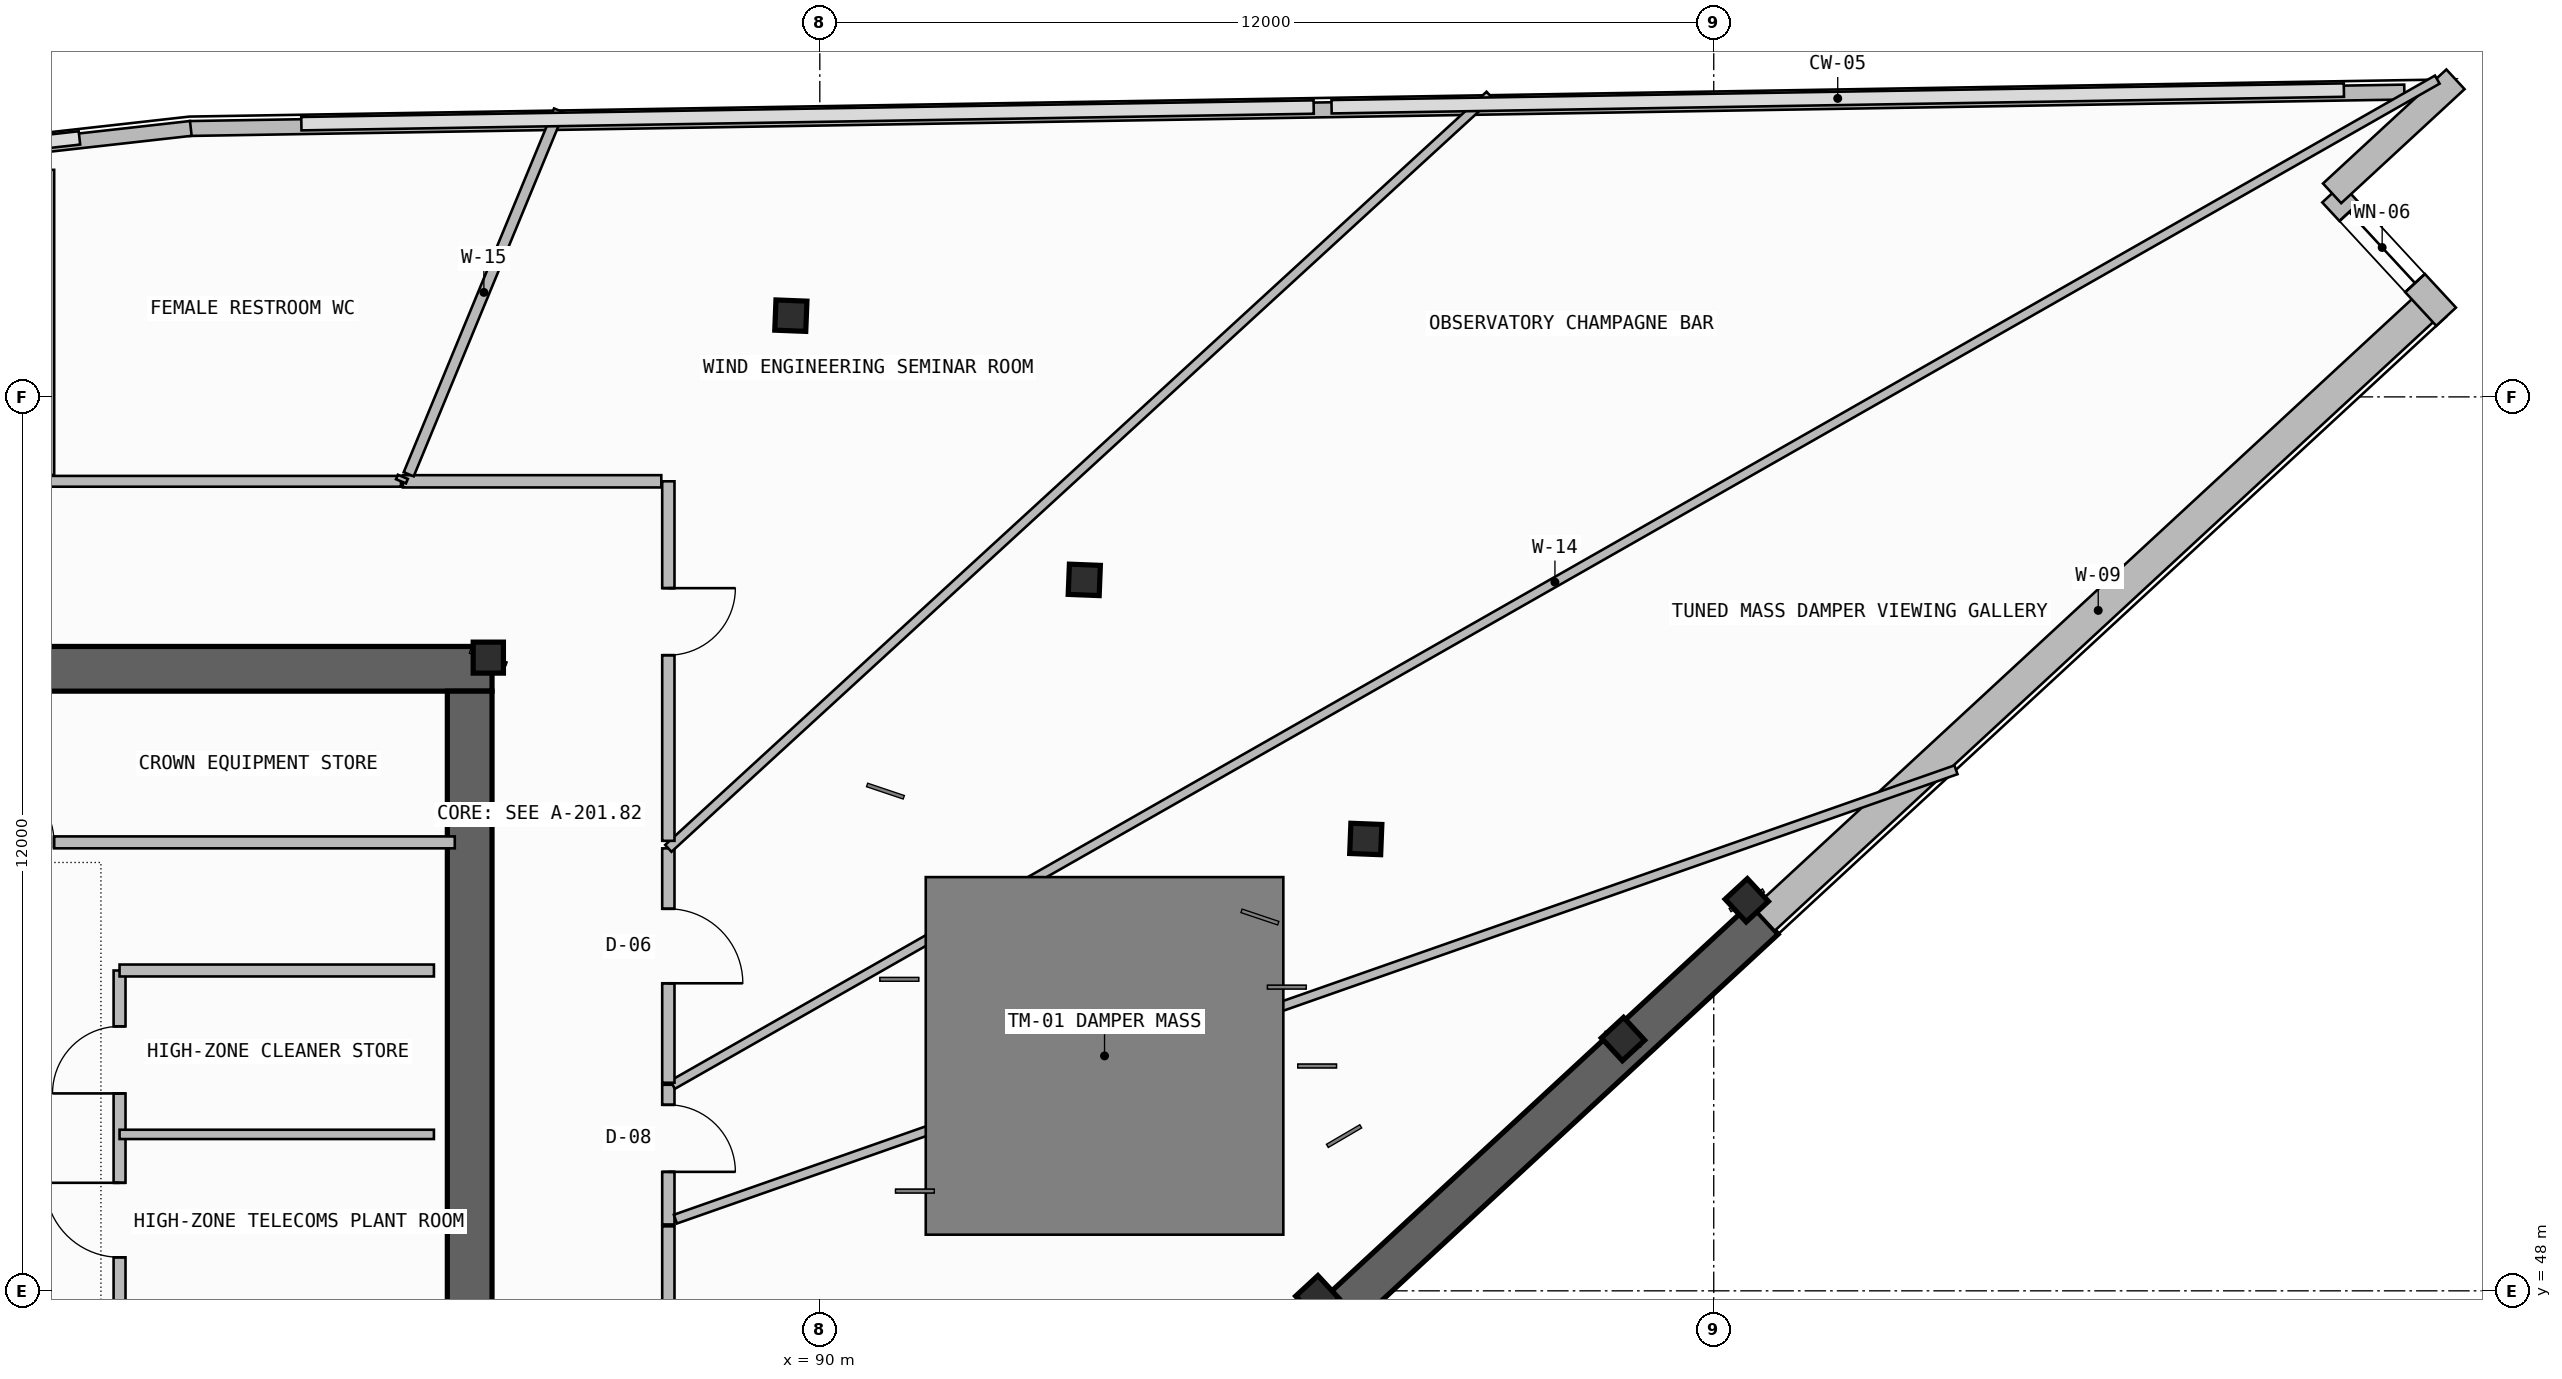
"""IFC4 building model, lengths in metres.
Left out: names, types, materials, properties, quantities, classifications, styles, units other than length and angle.
Written with IfcOpenShell. Run it as: python <this file> out.ifc"""

import sys

from ifc_helpers import new_model, si_unit, direction, frame, frame_2d, origin, origin_2d, place, context, subcontext, project, spatial, rectangle, i_section, extrude, element, fill, save


model = new_model("IFC4")
c1 = context("Model", 3, precision=1e-05, world=origin(), true_north=direction((0.0, 1.0)))
c2 = subcontext(c1, "Body", "Model", "MODEL_VIEW")
j1 = project(units=[si_unit("LENGTHUNIT", "METRE"), si_unit("PLANEANGLEUNIT", "RADIAN")], contexts=[c1])
p1 = place(None, origin())
s1 = spatial("IfcSite", under=j1, at=p1, CompositionType="ELEMENT")
p2 = place(p1, origin())
s2 = spatial("IfcBuilding", under=s1, at=p2, CompositionType="ELEMENT")
p3 = place(p2, frame((0.0, 0.0, 292.42)))
s3 = spatial("IfcBuildingStorey", under=s2, at=p3, CompositionType="ELEMENT", Elevation=292.42)
p4 = place(p3, frame((72.0, 56.35, -0.26), z_axis=(0.0, 0.0, 1.0), x_axis=(1.0, 0.0, 0.0)))
e1 = element("IfcWall", 1, at=p4, inside=s3, PredefinedType="SHEAR", context=c2, shape_type="SweptSolid", body=[
    extrude(rectangle(XDim=13.6, YDim=0.6, at=frame_2d((6.8, 0.0))), origin(), (0.0, 0.0, 1.0), 5.82),
])
p5 = place(p3, frame((85.3, 47.6, -0.26), z_axis=(0.0, 0.0, 1.0), x_axis=(0.0, 1.0, 0.0)))
e2 = element("IfcWall", 2, at=p5, inside=s3, PredefinedType="SHEAR", context=c2, shape_type="SweptSolid", body=[
    extrude(rectangle(XDim=8.45, YDim=0.6, at=frame_2d((4.225, 0.0))), origin(), (0.0, 0.0, 1.0), 5.82),
])
for number, where, z_axis, x_axis in (
    (3, (85.55, 56.5, 0.0), (0.0, 0.0, 1.0), (1.0, 0.0, 0.0)),
    (4, (96.679, 47.914, 0.0), (0.0, 0.0, 1.0), (0.734, 0.679, 0.0)),
    (5, (102.443, 53.242, 0.0), (0.0, 0.0, 1.0), (0.734, 0.679, 0.0)),
    (6, (100.782, 51.38, 0.0), (0.0, 0.0, 1.0), (0.734, 0.679, 0.0)),
    (7, (97.329, 54.065, 0.0), (0.0, 0.0, 1.0), (0.039, 0.999, 0.0)),
    (8, (93.55, 57.544, 0.0), (0.0, 0.0, 1.0), (0.039, 0.999, 0.0)),
    (9, (89.611, 61.09, 0.0), (0.0, 0.0, 1.0), (0.039, 0.999, 0.0)),
):
    element("IfcColumn", number, at=place(p3, frame(where, z_axis=z_axis, x_axis=x_axis)), inside=s3, PredefinedType="COLUMN", context=c2, shape_type="SweptSolid", body=[
        extrude(i_section(OverallWidth=0.406, OverallDepth=0.416, WebThickness=0.03, FlangeThickness=0.048, FilletRadius=0.015, at=origin_2d()), origin(), (0.0, 0.0, 1.0), 5.76),
    ])
p6 = place(p3, frame((90.508, 41.74, -0.26), z_axis=(0.0, 0.0, 1.0), x_axis=(0.734315848115, 0.678807951638, 0.0)))
e10 = element("IfcWall", 10, at=p6, inside=s3, PredefinedType="SHEAR", context=c2, shape_type="SweptSolid", body=[
    extrude(rectangle(XDim=16.573, YDim=0.55, at=frame_2d((8.286, 0.0))), origin(), (0.0, 0.0, 1.0), 5.82),
])
p7 = place(p3, frame((102.677, 52.989, 0.0), z_axis=(0.0, 0.0, 1.0), x_axis=(0.734331107219, 0.678791444386, 0.0)))
e11 = element("IfcWall", 11, at=p7, inside=s3, PredefinedType="SOLIDWALL", context=c2, shape_type="SweptSolid", body=[
    extrude(rectangle(XDim=12.211, YDim=0.42, at=frame_2d((6.106, 0.0))), origin(), (0.0, 0.0, 1.0), 2.195),
])
p8 = place(p3, frame((111.832, 61.076, 0.0), z_axis=(0.0, 0.0, 1.0), x_axis=(-0.678792531533, 0.734330102294, 0.0)))
e12 = element("IfcWall", 12, at=p8, inside=s3, PredefinedType="SOLIDWALL", context=c2, shape_type="SweptSolid", body=[
    extrude(rectangle(XDim=2.255, YDim=0.36, at=frame_2d((1.127, 0.0))), origin(), (0.0, 0.0, 1.0), 5.56),
])
p9 = place(p8, frame((0.615, 0.0, 0.45)))
e13 = element("IfcOpeningElement", 13, at=p9, cuts=e12, PredefinedType="OPENING", context=c2, shape_type="SweptSolid", body=[
    extrude(rectangle(XDim=1.3, YDim=2.4, at=frame_2d((0.65, 1.2))), frame((0.0, 0.19, 0.0), z_axis=(0.0, -1.0, 0.0), x_axis=(1.0, 0.0, 0.0)), (0.0, 0.0, 1.0), 0.38),
])
p10 = place(p3, frame((110.301, 62.732, 0.0), z_axis=(0.0, 0.0, 1.0), x_axis=(0.734330102294, 0.678792531533, 0.0)))
e14 = element("IfcWall", 14, at=p10, inside=s3, PredefinedType="SOLIDWALL", context=c2, shape_type="SweptSolid", body=[
    extrude(rectangle(XDim=2.255, YDim=0.36, at=frame_2d((1.127, 0.0))), origin(), (0.0, 0.0, 1.0), 5.56),
])
p11 = place(p3, frame((111.271, 64.092, 0.0), z_axis=(0.0, 0.0, 1.0), x_axis=(-0.999864741935, -0.016446818413, 0.0)))
e15 = element("IfcWall", 15, at=p11, inside=s3, PredefinedType="PARAPET", context=c2, shape_type="SweptSolid", body=[
    extrude(rectangle(XDim=29.733, YDim=0.2, at=frame_2d((14.866, 0.0))), origin(), (0.0, 0.0, 1.0), 1.15),
])
p12 = place(p3, frame((81.557, 63.604, 0.0), z_axis=(0.0, 0.0, 1.0), x_axis=(-0.993775831398, -0.111398370403, 0.0)))
e16 = element("IfcWall", 16, at=p12, inside=s3, PredefinedType="PARAPET", context=c2, shape_type="SweptSolid", body=[
    extrude(rectangle(XDim=29.764, YDim=0.2, at=frame_2d((14.882, 0.0))), origin(), (0.0, 0.0, 1.0), 1.15),
])
p13 = place(p3, frame((80.6, 47.7, 0.0), z_axis=(0.0, 0.0, 1.0), x_axis=(0.0, 1.0, 0.0)))
e17 = element("IfcWall", 17, at=p13, inside=s3, PredefinedType="SOLIDWALL", context=c2, shape_type="SweptSolid", body=[
    extrude(rectangle(XDim=4.6, YDim=0.16, at=frame_2d((2.3, 0.0))), origin(), (0.0, 0.0, 1.0), 5.56),
])
p14 = place(p13, frame((0.75, 0.0, 0.0)))
e18 = element("IfcOpeningElement", 18, at=p14, cuts=e17, PredefinedType="OPENING", context=c2, shape_type="SweptSolid", body=[
    extrude(rectangle(XDim=1.0, YDim=2.2, at=frame_2d((0.5, 1.1))), frame((0.0, 0.09, 0.0), z_axis=(0.0, -1.0, 0.0), x_axis=(1.0, 0.0, 0.0)), (0.0, 0.0, 1.0), 0.18),
])
p15 = place(p13, frame((2.95, 0.0, 0.0)))
e19 = element("IfcOpeningElement", 19, at=p15, cuts=e17, PredefinedType="OPENING", context=c2, shape_type="SweptSolid", body=[
    extrude(rectangle(XDim=0.9, YDim=2.1, at=frame_2d((0.45, 1.05))), frame((0.0, 0.09, 0.0), z_axis=(0.0, -1.0, 0.0), x_axis=(1.0, 0.0, 0.0)), (0.0, 0.0, 1.0), 0.18),
])
p16 = place(p3, frame((80.6, 52.3, 0.0), z_axis=(0.0, 0.0, 1.0), x_axis=(1.0, 0.0, 0.0)))
e20 = element("IfcWall", 20, at=p16, inside=s3, PredefinedType="SOLIDWALL", context=c2, shape_type="SweptSolid", body=[
    extrude(rectangle(XDim=4.22, YDim=0.16, at=frame_2d((2.11, 0.0))), origin(), (0.0, 0.0, 1.0), 5.56),
])
p17 = place(p3, frame((80.6, 50.1, 0.0), z_axis=(0.0, 0.0, 1.0), x_axis=(1.0, 0.0, 0.0)))
e21 = element("IfcWall", 21, at=p17, inside=s3, PredefinedType="PARTITIONING", context=c2, shape_type="SweptSolid", body=[
    extrude(rectangle(XDim=4.22, YDim=0.125, at=frame_2d((2.11, 0.0))), origin(), (0.0, 0.0, 1.0), 5.56),
])
p18 = place(p3, frame((73.02, 54.02, 0.0), z_axis=(0.0, 0.0, 1.0), x_axis=(1.0, 0.0, 0.0)))
e22 = element("IfcWall", 22, at=p18, inside=s3, PredefinedType="SOLIDWALL", context=c2, shape_type="SweptSolid", body=[
    extrude(rectangle(XDim=12.08, YDim=0.16, at=frame_2d((6.04, 0.0))), origin(), (0.0, 0.0, 1.0), 5.56),
])
p19 = place(p18, frame((0.5, 0.0, 0.0)))
e23 = element("IfcOpeningElement", 23, at=p19, cuts=e22, PredefinedType="OPENING", context=c2, shape_type="SweptSolid", body=[
    extrude(rectangle(XDim=1.1, YDim=2.25, at=frame_2d((0.55, 1.125))), frame((0.0, 0.09, 0.0), z_axis=(0.0, -1.0, 0.0), x_axis=(1.0, 0.0, 0.0)), (0.0, 0.0, 1.0), 0.18),
])
p20 = place(p18, frame((2.32, 0.0, 0.0)))
e24 = element("IfcOpeningElement", 24, at=p20, cuts=e22, PredefinedType="OPENING", context=c2, shape_type="SweptSolid", body=[
    extrude(rectangle(XDim=1.1, YDim=2.25, at=frame_2d((0.55, 1.125))), frame((0.0, 0.09, 0.0), z_axis=(0.0, -1.0, 0.0), x_axis=(1.0, 0.0, 0.0)), (0.0, 0.0, 1.0), 0.18),
])
p21 = place(p18, frame((5.8, 0.0, 0.0)))
e25 = element("IfcOpeningElement", 25, at=p21, cuts=e22, PredefinedType="OPENING", context=c2, shape_type="SweptSolid", body=[
    extrude(rectangle(XDim=0.9, YDim=2.1, at=frame_2d((0.45, 1.05))), frame((0.0, 0.09, 0.0), z_axis=(0.0, -1.0, 0.0), x_axis=(1.0, 0.0, 0.0)), (0.0, 0.0, 1.0), 0.18),
])
p22 = place(p3, frame((87.967, 48.891, 0.0), z_axis=(0.0, 0.0, 1.0), x_axis=(0.0, 1.0, 0.0)))
e26 = element("IfcWall", 26, at=p22, inside=s3, PredefinedType="PARTITIONING", context=c2, shape_type="SweptSolid", body=[
    extrude(rectangle(XDim=1.875, YDim=0.165, at=frame_2d((0.938, 0.0))), origin(), (0.0, 0.0, 1.0), 5.56),
])
p23 = place(p22, frame((0.706, 0.0, 0.0)))
e27 = element("IfcOpeningElement", 27, at=p23, cuts=e26, PredefinedType="OPENING", context=c2, shape_type="SweptSolid", body=[
    extrude(rectangle(XDim=0.9, YDim=2.1, at=frame_2d((0.45, 1.05))), frame((0.0, 0.093, 0.0), z_axis=(0.0, -1.0, 0.0), x_axis=(1.0, 0.0, 0.0)), (0.0, 0.0, 1.0), 0.185),
])
p24 = place(p3, frame((105.252, 54.994, 0.0), z_axis=(0.0, 0.0, 1.0), x_axis=(-0.943604021882, -0.33107619952, 0.0)))
e28 = element("IfcWall", 28, at=p24, inside=s3, PredefinedType="PARTITIONING", context=c2, shape_type="SweptSolid", body=[
    extrude(rectangle(XDim=18.218, YDim=0.125, at=frame_2d((9.109, 0.0))), origin(), (0.0, 0.0, 1.0), 2.195),
])
p25 = place(p3, frame((88.024, 50.766, 0.0), z_axis=(0.0, 0.0, 1.0), x_axis=(0.868931723382, 0.494931975226, 0.0)))
e29 = element("IfcWall", 29, at=p25, inside=s3, PredefinedType="PARTITIONING", context=c2, shape_type="SweptSolid", body=[
    extrude(rectangle(XDim=27.262, YDim=0.125, at=frame_2d((13.631, 0.0))), origin(), (0.0, 0.0, 1.0), 2.195),
])
p26 = place(p3, frame((87.967, 47.62, 0.0), z_axis=(0.0, 0.0, 1.0), x_axis=(0.0, 1.0, 0.0)))
e30 = element("IfcWall", 30, at=p26, inside=s3, PredefinedType="PARTITIONING", context=c2, shape_type="SweptSolid", body=[
    extrude(rectangle(XDim=1.246, YDim=0.165, at=frame_2d((0.623, 0.0))), origin(), (0.0, 0.0, 1.0), 5.56),
])
p27 = place(p3, frame((87.967, 50.793, 0.0), z_axis=(0.0, 0.0, 1.0), x_axis=(0.0, 1.0, 0.0)))
e31 = element("IfcWall", 31, at=p27, inside=s3, PredefinedType="PARTITIONING", context=c2, shape_type="SweptSolid", body=[
    extrude(rectangle(XDim=3.146, YDim=0.165, at=frame_2d((1.573, 0.0))), origin(), (0.0, 0.0, 1.0), 5.56),
])
p28 = place(p27, frame((1.335, 0.0, 0.0)))
e32 = element("IfcOpeningElement", 32, at=p28, cuts=e31, PredefinedType="OPENING", context=c2, shape_type="SweptSolid", body=[
    extrude(rectangle(XDim=1.0, YDim=2.2, at=frame_2d((0.5, 1.1))), frame((0.0, 0.093, 0.0), z_axis=(0.0, -1.0, 0.0), x_axis=(1.0, 0.0, 0.0)), (0.0, 0.0, 1.0), 0.185),
])
p29 = place(p3, frame((87.967, 53.939, 0.0), z_axis=(0.0, 0.0, 1.0), x_axis=(0.737044386096, 0.675844340751, 0.0)))
e33 = element("IfcWall", 33, at=p29, inside=s3, PredefinedType="PARTITIONING", context=c2, shape_type="SweptSolid", body=[
    extrude(rectangle(XDim=14.959, YDim=0.125, at=frame_2d((7.48, 0.0))), origin(), (0.0, 0.0, 1.0), 2.195),
])
p30 = place(p3, frame((87.967, 54.041, 0.0), z_axis=(0.0, 0.0, 1.0), x_axis=(0.0, 1.0, 0.0)))
e34 = element("IfcWall", 34, at=p30, inside=s3, PredefinedType="PARTITIONING", context=c2, shape_type="SweptSolid", body=[
    extrude(rectangle(XDim=4.826, YDim=0.165, at=frame_2d((2.413, 0.0))), origin(), (0.0, 0.0, 1.0), 2.195),
])
p31 = place(p30, frame((2.492, 0.0, 0.0)))
e35 = element("IfcOpeningElement", 35, at=p31, cuts=e34, PredefinedType="OPENING", context=c2, shape_type="SweptSolid", body=[
    extrude(rectangle(XDim=0.9, YDim=2.1, at=frame_2d((0.45, 1.05))), frame((0.0, 0.093, 0.0), z_axis=(0.0, -1.0, 0.0), x_axis=(1.0, 0.0, 0.0)), (0.0, 0.0, 1.0), 0.185),
])
p32 = place(p3, frame((87.872, 58.867, 0.0), z_axis=(0.0, 0.0, 1.0), x_axis=(-1.0, 0.0, 0.0)))
e36 = element("IfcWall", 36, at=p32, inside=s3, PredefinedType="PARTITIONING", context=c2, shape_type="SweptSolid", body=[
    extrude(rectangle(XDim=3.469, YDim=0.165, at=frame_2d((1.734, 0.0))), origin(), (0.0, 0.0, 1.0), 5.045),
])
p33 = place(p3, frame((84.482, 58.961, 0.0), z_axis=(0.0, 0.0, 1.0), x_axis=(0.381890578818, 0.92420754477, 0.0)))
e37 = element("IfcWall", 37, at=p33, inside=s3, PredefinedType="PARTITIONING", context=c2, shape_type="SweptSolid", body=[
    extrude(rectangle(XDim=5.284, YDim=0.145, at=frame_2d((2.642, 0.0))), origin(), (0.0, 0.0, 1.0), 5.56),
])
p34 = place(p3, frame((84.377, 58.867, 0.0), z_axis=(0.0, 0.0, 1.0), x_axis=(-1.0, 0.0, 0.0)))
e38 = element("IfcWall", 38, at=p34, inside=s3, PredefinedType="PARTITIONING", context=c2, shape_type="SweptSolid", body=[
    extrude(rectangle(XDim=4.728, YDim=0.145, at=frame_2d((2.364, 0.0))), origin(), (0.0, 0.0, 1.0), 5.56),
])
p35 = place(p3, frame((79.65, 58.951, 0.0), z_axis=(0.0, 0.0, 1.0), x_axis=(0.0, 1.0, 0.0)))
e39 = element("IfcWall", 39, at=p35, inside=s3, PredefinedType="PARTITIONING", context=c2, shape_type="SweptSolid", body=[
    extrude(rectangle(XDim=4.096, YDim=0.145, at=frame_2d((2.048, 0.0))), origin(), (0.0, 0.0, 1.0), 5.56),
])
p36 = place(p3, frame((84.403, 58.927, 0.0), z_axis=(0.0, 0.0, 1.0), x_axis=(-0.386212285798, -0.922409925304, 0.0)))
e40 = element("IfcWall", 40, at=p36, inside=s3, PredefinedType="PARTITIONING", context=c2, shape_type="SweptSolid", body=[
    extrude(rectangle(XDim=0.065, YDim=0.145, at=frame_2d((0.033, 0.0))), origin(), (0.0, 0.0, 1.0), 5.56),
])
p37 = place(p9, origin())
e41 = element("IfcWindow", 41, at=p37, inside=s3, PartitioningType="SINGLE_PANEL", PredefinedType="WINDOW", context=c2, shape_type="SweptSolid", body=[
    extrude(rectangle(XDim=1.3, YDim=2.4, at=frame_2d((0.65, 1.2))), frame((0.0, 0.03, 0.0), z_axis=(0.0, -1.0, 0.0), x_axis=(1.0, 0.0, 0.0)), (0.0, 0.0, 1.0), 0.06),
])
fill(e13, e41)
p38 = place(p14, origin())
e42 = element("IfcDoor", 42, at=p38, inside=s3, OperationType="SINGLE_SWING_RIGHT", PredefinedType="DOOR", context=c2, shape_type="SweptSolid", body=[
    extrude(rectangle(XDim=1.0, YDim=2.2, at=frame_2d((0.5, 1.1))), frame((0.0, 0.025, 0.0), z_axis=(0.0, -1.0, 0.0), x_axis=(1.0, 0.0, 0.0)), (0.0, 0.0, 1.0), 0.05),
])
fill(e18, e42)
p39 = place(p15, origin())
e43 = element("IfcDoor", 43, at=p39, inside=s3, OperationType="SINGLE_SWING_LEFT", PredefinedType="DOOR", context=c2, shape_type="SweptSolid", body=[
    extrude(rectangle(XDim=0.9, YDim=2.1, at=frame_2d((0.45, 1.05))), frame((0.0, 0.025, 0.0), z_axis=(0.0, -1.0, 0.0), x_axis=(1.0, 0.0, 0.0)), (0.0, 0.0, 1.0), 0.05),
])
fill(e19, e43)
p40 = place(p21, origin())
e44 = element("IfcDoor", 44, at=p40, inside=s3, OperationType="SINGLE_SWING_LEFT", PredefinedType="DOOR", context=c2, shape_type="SweptSolid", body=[
    extrude(rectangle(XDim=0.9, YDim=2.1, at=frame_2d((0.45, 1.05))), frame((0.0, 0.025, 0.0), z_axis=(0.0, -1.0, 0.0), x_axis=(1.0, 0.0, 0.0)), (0.0, 0.0, 1.0), 0.05),
])
fill(e25, e44)
p41 = place(p23, frame((0.9, 0.0, 0.0), z_axis=(0.0, 0.0, 1.0), x_axis=(-1.0, 0.0, 0.0)))
e45 = element("IfcDoor", 45, at=p41, inside=s3, OperationType="SINGLE_SWING_RIGHT", PredefinedType="DOOR", context=c2, shape_type="SweptSolid", body=[
    extrude(rectangle(XDim=0.9, YDim=2.1, at=frame_2d((0.45, 1.05))), frame((0.0, 0.025, 0.0), z_axis=(0.0, -1.0, 0.0), x_axis=(1.0, 0.0, 0.0)), (0.0, 0.0, 1.0), 0.05),
])
fill(e27, e45)
p42 = place(p28, frame((1.0, 0.0, 0.0), z_axis=(0.0, 0.0, 1.0), x_axis=(-1.0, 0.0, 0.0)))
e46 = element("IfcDoor", 46, at=p42, inside=s3, OperationType="SINGLE_SWING_RIGHT", PredefinedType="DOOR", context=c2, shape_type="SweptSolid", body=[
    extrude(rectangle(XDim=1.0, YDim=2.2, at=frame_2d((0.5, 1.1))), frame((0.0, 0.025, 0.0), z_axis=(0.0, -1.0, 0.0), x_axis=(1.0, 0.0, 0.0)), (0.0, 0.0, 1.0), 0.05),
])
fill(e32, e46)
p43 = place(p31, frame((0.9, 0.0, 0.0), z_axis=(0.0, 0.0, 1.0), x_axis=(-1.0, 0.0, 0.0)))
e47 = element("IfcDoor", 47, at=p43, inside=s3, OperationType="SINGLE_SWING_LEFT", PredefinedType="DOOR", context=c2, shape_type="SweptSolid", body=[
    extrude(rectangle(XDim=0.9, YDim=2.1, at=frame_2d((0.45, 1.05))), frame((0.0, 0.025, 0.0), z_axis=(0.0, -1.0, 0.0), x_axis=(1.0, 0.0, 0.0)), (0.0, 0.0, 1.0), 0.05),
])
fill(e35, e47)
save(model, sys.argv[1])
